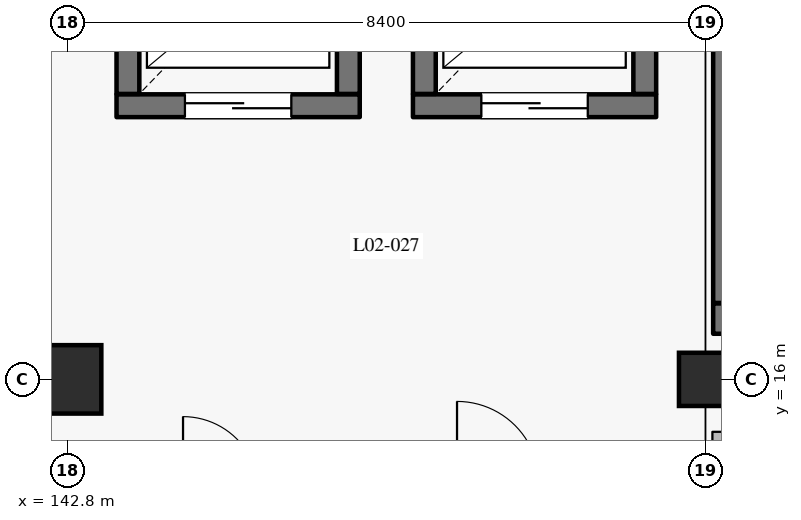
"""IFC4 building model, lengths in metres.
Left out: names, types, materials, properties, quantities, classifications, styles, units other than length and angle.
Written with IfcOpenShell. Run it as: python <this file> out.ifc"""

import sys

from ifc_helpers import new_model, si_unit, direction, frame, frame_2d, origin, origin_2d, place, context, subcontext, project, spatial, rectangle, extrude, element, fill, save


model = new_model("IFC4")
c1 = context("Model", 3, precision=1e-05, world=origin(), true_north=direction((0.0, 1.0)))
c2 = subcontext(c1, "Body", "Model", "MODEL_VIEW")
j1 = project(units=[si_unit("LENGTHUNIT", "METRE"), si_unit("PLANEANGLEUNIT", "RADIAN")], contexts=[c1])
p1 = place(None, origin())
s1 = spatial("IfcSite", under=j1, at=p1, CompositionType="ELEMENT")
p2 = place(p1, origin())
s2 = spatial("IfcBuilding", under=s1, at=p2, CompositionType="ELEMENT")
p3 = place(p2, frame((0.0, 0.0, 11.4)))
s3 = spatial("IfcBuildingStorey", under=s2, at=p3, CompositionType="ELEMENT", Elevation=11.4)
p4 = place(p3, frame((142.8, 16.0, 0.0), z_axis=(0.0, 0.0, 1.0), x_axis=(1.0, 0.0, 0.0)))
e1 = element("IfcColumn", 1, at=p4, inside=s3, PredefinedType="COLUMN", context=c2, shape_type="SweptSolid", body=[
    extrude(rectangle(XDim=0.9, YDim=0.9, at=origin_2d()), origin(), (0.0, 0.0, 1.0), 4.8),
])
p5 = place(p3, frame((151.2, 16.0, 0.0), z_axis=(0.0, 0.0, 1.0), x_axis=(1.0, 0.0, 0.0)))
e2 = element("IfcColumn", 2, at=p5, inside=s3, PredefinedType="COLUMN", context=c2, shape_type="SweptSolid", body=[
    extrude(rectangle(XDim=0.7, YDim=0.7, at=origin_2d()), origin(), (0.0, 0.0, 1.0), 4.8),
])
p6 = place(p3, frame((143.45, 19.6, 0.0), z_axis=(0.0, 0.0, 1.0), x_axis=(1.0, 0.0, 0.0)))
e3 = element("IfcWall", 3, at=p6, inside=s3, PredefinedType="SHEAR", context=c2, shape_type="SweptSolid", body=[
    extrude(rectangle(XDim=3.2, YDim=0.3, at=frame_2d((1.6, 0.0))), origin(), (0.0, 0.0, 1.0), 4.535),
])
p7 = place(p6, frame((0.9, 0.0, 0.0)))
e4 = element("IfcOpeningElement", 4, at=p7, cuts=e3, PredefinedType="OPENING", context=c2, shape_type="SweptSolid", body=[
    extrude(rectangle(XDim=1.4, YDim=2.35, at=frame_2d((0.7, 1.175))), frame((0.0, 0.16, 0.0), z_axis=(0.0, -1.0, 0.0), x_axis=(1.0, 0.0, 0.0)), (0.0, 0.0, 1.0), 0.32),
])
for number, where, z_axis, x_axis in (
    (5, (146.5, 19.755, 0.0), (0.0, 0.0, 1.0), (0.0, 1.0, 0.0)),
    (6, (143.6, 22.445, 0.0), (0.0, 0.0, 1.0), (0.0, -1.0, 0.0)),
):
    element("IfcWall", number, at=place(p3, frame(where, z_axis=z_axis, x_axis=x_axis)), inside=s3, PredefinedType="SHEAR", context=c2, shape_type="SweptSolid", body=[
        extrude(rectangle(XDim=2.69, YDim=0.3, at=frame_2d((1.345, 0.0))), origin(), (0.0, 0.0, 1.0), 4.535),
    ])
p8 = place(p3, frame((147.35, 19.6, 0.0), z_axis=(0.0, 0.0, 1.0), x_axis=(1.0, 0.0, 0.0)))
e7 = element("IfcWall", 7, at=p8, inside=s3, PredefinedType="SHEAR", context=c2, shape_type="SweptSolid", body=[
    extrude(rectangle(XDim=3.2, YDim=0.3, at=frame_2d((1.6, 0.0))), origin(), (0.0, 0.0, 1.0), 4.535),
])
p9 = place(p8, frame((0.9, 0.0, 0.0)))
e8 = element("IfcOpeningElement", 8, at=p9, cuts=e7, PredefinedType="OPENING", context=c2, shape_type="SweptSolid", body=[
    extrude(rectangle(XDim=1.4, YDim=2.35, at=frame_2d((0.7, 1.175))), frame((0.0, 0.16, 0.0), z_axis=(0.0, -1.0, 0.0), x_axis=(1.0, 0.0, 0.0)), (0.0, 0.0, 1.0), 0.32),
])
for number, where, z_axis, x_axis in (
    (9, (150.4, 19.755, 0.0), (0.0, 0.0, 1.0), (0.0, 1.0, 0.0)),
    (10, (147.5, 22.445, 0.0), (0.0, 0.0, 1.0), (0.0, -1.0, 0.0)),
):
    element("IfcWall", number, at=place(p3, frame(where, z_axis=z_axis, x_axis=x_axis)), inside=s3, PredefinedType="SHEAR", context=c2, shape_type="SweptSolid", body=[
        extrude(rectangle(XDim=2.69, YDim=0.3, at=frame_2d((1.345, 0.0))), origin(), (0.0, 0.0, 1.0), 4.535),
    ])
p10 = place(p3, frame((151.3, 16.8, 0.0), z_axis=(0.0, 0.0, 1.0), x_axis=(1.0, 0.0, 0.0)))
e11 = element("IfcWall", 11, at=p10, inside=s3, PredefinedType="SHEAR", context=c2, shape_type="SweptSolid", body=[
    extrude(rectangle(XDim=8.2, YDim=0.4, at=frame_2d((4.1, 0.0))), origin(), (0.0, 0.0, 1.0), 4.535),
])
p11 = place(p3, frame((151.5, 17.005, 0.0), z_axis=(0.0, 0.0, 1.0), x_axis=(0.0, 1.0, 0.0)))
e12 = element("IfcWall", 12, at=p11, inside=s3, PredefinedType="SHEAR", context=c2, shape_type="SweptSolid", body=[
    extrude(rectangle(XDim=3.95, YDim=0.4, at=frame_2d((1.975, 0.0))), origin(), (0.0, 0.0, 1.0), 4.535),
])
p12 = place(p3, frame((151.29, 15.23, 0.0), z_axis=(0.0, 0.0, 1.0), x_axis=(1.0, 0.0, 0.0)))
e13 = element("IfcWall", 13, at=p12, inside=s3, PredefinedType="PARTITIONING", context=c2, shape_type="SweptSolid", body=[
    extrude(rectangle(XDim=1.81, YDim=0.16, at=frame_2d((0.905, 0.0))), origin(), (0.0, 0.0, 1.0), 4.535),
])
p13 = place(p7, origin())
e14 = element("IfcDoor", 14, at=p13, inside=s3, OperationType="DOUBLE_DOOR_SLIDING", PredefinedType="DOOR", context=c2, shape_type="SweptSolid", body=[
    extrude(rectangle(XDim=1.4, YDim=2.35, at=frame_2d((0.7, 1.175))), frame((0.0, 0.025, 0.0), z_axis=(0.0, -1.0, 0.0), x_axis=(1.0, 0.0, 0.0)), (0.0, 0.0, 1.0), 0.05),
])
fill(e4, e14)
p14 = place(p9, origin())
e15 = element("IfcDoor", 15, at=p14, inside=s3, OperationType="DOUBLE_DOOR_SLIDING", PredefinedType="DOOR", context=c2, shape_type="SweptSolid", body=[
    extrude(rectangle(XDim=1.4, YDim=2.35, at=frame_2d((0.7, 1.175))), frame((0.0, 0.025, 0.0), z_axis=(0.0, -1.0, 0.0), x_axis=(1.0, 0.0, 0.0)), (0.0, 0.0, 1.0), 0.05),
])
fill(e8, e15)
save(model, sys.argv[1])
